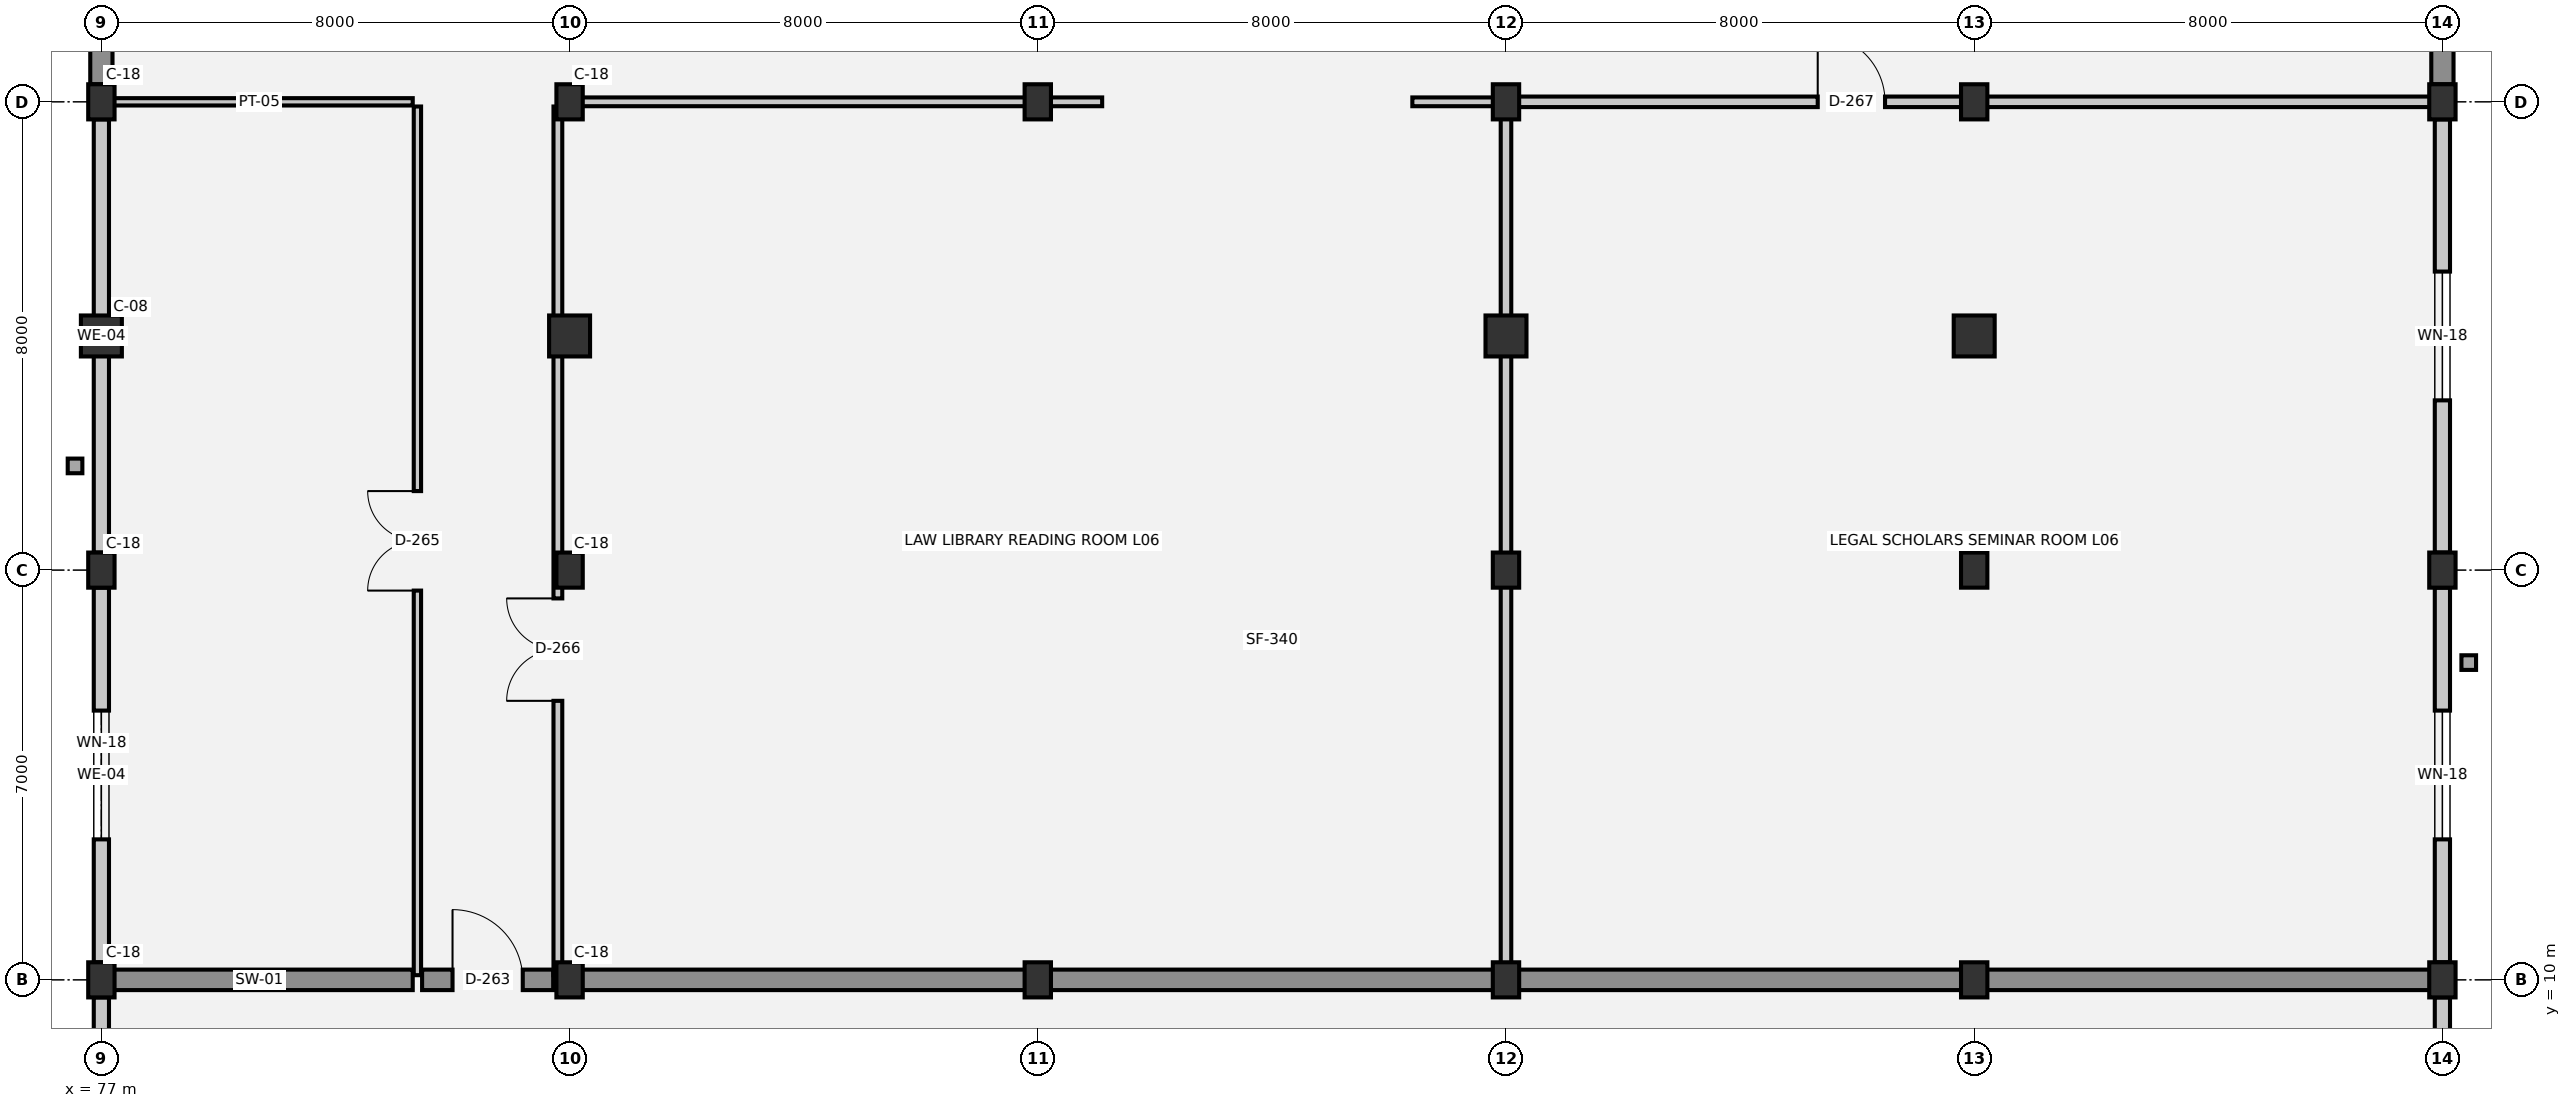
"""IFC4 building model, lengths in metres.
Left out: names, types, materials, properties, quantities, classifications, styles, units other than length and angle.
Written with IfcOpenShell. Run it as: python <this file> out.ifc"""

import sys

from ifc_helpers import new_model, si_unit, direction, frame, frame_2d, origin, origin_2d, place, context, subcontext, project, spatial, rectangle, circle, extrude, element, fill, save


model = new_model("IFC4")
c1 = context("Model", 3, precision=1e-05, world=origin(), true_north=direction((0.0, 1.0)))
c2 = subcontext(c1, "Body", "Model", "MODEL_VIEW")
j1 = project(units=[si_unit("LENGTHUNIT", "METRE"), si_unit("PLANEANGLEUNIT", "RADIAN")], contexts=[c1])
p1 = place(None, origin())
s1 = spatial("IfcSite", under=j1, at=p1, CompositionType="ELEMENT")
p2 = place(p1, origin())
s2 = spatial("IfcBuilding", under=s1, at=p2, CompositionType="ELEMENT")
p3 = place(p2, frame((0.0, 0.0, 22.05)))
s3 = spatial("IfcBuildingStorey", under=s2, at=p3, CompositionType="ELEMENT", Elevation=22.05)
for number, where, z_axis, x_axis in (
    (1, (77.0, 10.0, 0.0), (0.0, 0.0, 1.0), (1.0, 0.0, 0.0)),
    (2, (77.0, 17.0, 0.0), (0.0, 0.0, 1.0), (1.0, 0.0, 0.0)),
    (3, (77.0, 25.0, 0.0), (0.0, 0.0, 1.0), (1.0, 0.0, 0.0)),
    (4, (85.0, 10.0, 0.0), (0.0, 0.0, 1.0), (1.0, 0.0, 0.0)),
    (5, (85.0, 17.0, 0.0), (0.0, 0.0, 1.0), (1.0, 0.0, 0.0)),
    (6, (85.0, 25.0, 0.0), (0.0, 0.0, 1.0), (1.0, 0.0, 0.0)),
    (7, (93.0, 10.0, 0.0), (0.0, 0.0, 1.0), (1.0, 0.0, 0.0)),
    (8, (93.0, 25.0, 0.0), (0.0, 0.0, 1.0), (1.0, 0.0, 0.0)),
    (9, (101.0, 10.0, 0.0), (0.0, 0.0, 1.0), (1.0, 0.0, 0.0)),
    (10, (101.0, 17.0, 0.0), (0.0, 0.0, 1.0), (1.0, 0.0, 0.0)),
    (11, (101.0, 25.0, 0.0), (0.0, 0.0, 1.0), (1.0, 0.0, 0.0)),
    (12, (109.0, 10.0, 0.0), (0.0, 0.0, 1.0), (1.0, 0.0, 0.0)),
    (13, (109.0, 17.0, 0.0), (0.0, 0.0, 1.0), (1.0, 0.0, 0.0)),
    (14, (109.0, 25.0, 0.0), (0.0, 0.0, 1.0), (1.0, 0.0, 0.0)),
    (15, (117.0, 10.0, 0.0), (0.0, 0.0, 1.0), (1.0, 0.0, 0.0)),
    (16, (117.0, 17.0, 0.0), (0.0, 0.0, 1.0), (1.0, 0.0, 0.0)),
    (17, (117.0, 25.0, 0.0), (0.0, 0.0, 1.0), (1.0, 0.0, 0.0)),
):
    element("IfcColumn", number, at=place(p3, frame(where, z_axis=z_axis, x_axis=x_axis)), inside=s3, PredefinedType="COLUMN", context=c2, shape_type="SweptSolid", body=[
        extrude(rectangle(XDim=0.45, YDim=0.6, at=origin_2d()), origin(), (0.0, 0.0, 1.0), 3.75),
    ])
for number, where, z_axis, x_axis in (
    (18, (77.0, 21.0, 0.0), (0.0, 0.0, 1.0), (1.0, 0.0, 0.0)),
    (19, (85.0, 21.0, 0.0), (0.0, 0.0, 1.0), (1.0, 0.0, 0.0)),
    (20, (101.0, 21.0, 0.0), (0.0, 0.0, 1.0), (1.0, 0.0, 0.0)),
    (21, (109.0, 21.0, 0.0), (0.0, 0.0, 1.0), (1.0, 0.0, 0.0)),
):
    element("IfcColumn", number, at=place(p3, frame(where, z_axis=z_axis, x_axis=x_axis)), inside=s3, PredefinedType="COLUMN", context=c2, shape_type="SweptSolid", body=[
        extrude(circle(Radius=0.35, at=origin_2d()), origin(), (0.0, 0.0, 1.0), 3.75),
    ])
p4 = place(p3, frame((77.0, 4.3, 0.0), z_axis=(0.0, 0.0, 1.0), x_axis=(0.0, 1.0, 0.0)))
e22 = element("IfcWall", 22, at=p4, inside=s3, PredefinedType="SOLIDWALL", context=c2, shape_type="SweptSolid", body=[
    extrude(rectangle(XDim=5.4, YDim=0.26, at=frame_2d((2.7, 0.0))), origin(), (0.0, 0.0, 1.0), 2.71),
])
p5 = place(p4, frame((2.15, 0.0, 0.9)))
e23 = element("IfcOpeningElement", 23, at=p5, cuts=e22, PredefinedType="OPENING", context=c2, shape_type="SweptSolid", body=[
    extrude(rectangle(XDim=1.1, YDim=1.2, at=frame_2d((0.55, 0.6))), frame((0.0, 0.14, 0.0), z_axis=(0.0, -1.0, 0.0), x_axis=(1.0, 0.0, 0.0)), (0.0, 0.0, 1.0), 0.28),
])
p6 = place(p3, frame((77.0, 10.3, 0.0), z_axis=(0.0, 0.0, 1.0), x_axis=(0.0, 1.0, 0.0)))
e24 = element("IfcWall", 24, at=p6, inside=s3, PredefinedType="SOLIDWALL", context=c2, shape_type="SweptSolid", body=[
    extrude(rectangle(XDim=6.4, YDim=0.26, at=frame_2d((3.2, 0.0))), origin(), (0.0, 0.0, 1.0), 2.71),
])
p7 = place(p6, frame((2.1, 0.0, 0.9)))
e25 = element("IfcOpeningElement", 25, at=p7, cuts=e24, PredefinedType="OPENING", context=c2, shape_type="SweptSolid", body=[
    extrude(rectangle(XDim=2.2, YDim=1.0, at=frame_2d((1.1, 0.5))), frame((0.0, 0.14, 0.0), z_axis=(0.0, -1.0, 0.0), x_axis=(1.0, 0.0, 0.0)), (0.0, 0.0, 1.0), 0.28),
])
p8 = place(p3, frame((77.0, 17.3, 0.0), z_axis=(0.0, 0.0, 1.0), x_axis=(0.0, 1.0, 0.0)))
e26 = element("IfcWall", 26, at=p8, inside=s3, PredefinedType="SOLIDWALL", context=c2, shape_type="SweptSolid", body=[
    extrude(rectangle(XDim=7.4, YDim=0.26, at=frame_2d((3.7, 0.0))), origin(), (0.0, 0.0, 1.0), 2.71),
])
for number, where, z_axis, x_axis in (
    (27, (77.0, 25.3, 0.0), (0.0, 0.0, 1.0), (0.0, 1.0, 0.0)),
    (28, (117.0, 31.7, 0.0), (0.0, 0.0, 1.0), (0.0, -1.0, 0.0)),
):
    element("IfcWall", number, at=place(p3, frame(where, z_axis=z_axis, x_axis=x_axis)), inside=s3, PredefinedType="STANDARD", context=c2, shape_type="SweptSolid", body=[
        extrude(rectangle(XDim=6.4, YDim=0.38, at=frame_2d((3.2, 0.0))), origin(), (0.0, 0.0, 1.0), 2.71),
    ])
p9 = place(p3, frame((117.0, 24.7, 0.0), z_axis=(0.0, 0.0, 1.0), x_axis=(0.0, -1.0, 0.0)))
e29 = element("IfcWall", 29, at=p9, inside=s3, PredefinedType="SOLIDWALL", context=c2, shape_type="SweptSolid", body=[
    extrude(rectangle(XDim=7.4, YDim=0.26, at=frame_2d((3.7, 0.0))), origin(), (0.0, 0.0, 1.0), 2.71),
])
p10 = place(p9, frame((2.6, 0.0, 0.9)))
e30 = element("IfcOpeningElement", 30, at=p10, cuts=e29, PredefinedType="OPENING", context=c2, shape_type="SweptSolid", body=[
    extrude(rectangle(XDim=2.2, YDim=1.0, at=frame_2d((1.1, 0.5))), frame((0.0, 0.14, 0.0), z_axis=(0.0, -1.0, 0.0), x_axis=(1.0, 0.0, 0.0)), (0.0, 0.0, 1.0), 0.28),
])
p11 = place(p3, frame((117.0, 16.7, 0.0), z_axis=(0.0, 0.0, 1.0), x_axis=(0.0, -1.0, 0.0)))
e31 = element("IfcWall", 31, at=p11, inside=s3, PredefinedType="SOLIDWALL", context=c2, shape_type="SweptSolid", body=[
    extrude(rectangle(XDim=6.4, YDim=0.26, at=frame_2d((3.2, 0.0))), origin(), (0.0, 0.0, 1.0), 2.71),
])
p12 = place(p11, frame((2.1, 0.0, 0.9)))
e32 = element("IfcOpeningElement", 32, at=p12, cuts=e31, PredefinedType="OPENING", context=c2, shape_type="SweptSolid", body=[
    extrude(rectangle(XDim=2.2, YDim=1.0, at=frame_2d((1.1, 0.5))), frame((0.0, 0.14, 0.0), z_axis=(0.0, -1.0, 0.0), x_axis=(1.0, 0.0, 0.0)), (0.0, 0.0, 1.0), 0.28),
])
p13 = place(p3, frame((117.0, 9.7, 0.0), z_axis=(0.0, 0.0, 1.0), x_axis=(0.0, -1.0, 0.0)))
e33 = element("IfcWall", 33, at=p13, inside=s3, PredefinedType="SOLIDWALL", context=c2, shape_type="SweptSolid", body=[
    extrude(rectangle(XDim=5.4, YDim=0.26, at=frame_2d((2.7, 0.0))), origin(), (0.0, 0.0, 1.0), 2.71),
])
p14 = place(p13, frame((2.15, 0.0, 0.9)))
e34 = element("IfcOpeningElement", 34, at=p14, cuts=e33, PredefinedType="OPENING", context=c2, shape_type="SweptSolid", body=[
    extrude(rectangle(XDim=1.1, YDim=1.2, at=frame_2d((0.55, 0.6))), frame((0.0, 0.14, 0.0), z_axis=(0.0, -1.0, 0.0), x_axis=(1.0, 0.0, 0.0)), (0.0, 0.0, 1.0), 0.28),
])
p15 = place(p3, frame((77.08, 10.0, 0.0), z_axis=(0.0, 0.0, 1.0), x_axis=(1.0, 0.0, 0.0)))
e35 = element("IfcWall", 35, at=p15, inside=s3, PredefinedType="SHEAR", context=c2, shape_type="SweptSolid", body=[
    extrude(rectangle(XDim=5.24, YDim=0.35, at=frame_2d((2.62, 0.0))), origin(), (0.0, 0.0, 1.0), 3.39),
])
p16 = place(p3, frame((82.48, 10.0, 0.0), z_axis=(0.0, 0.0, 1.0), x_axis=(1.0, 0.0, 0.0)))
e36 = element("IfcWall", 36, at=p16, inside=s3, PredefinedType="SHEAR", context=c2, shape_type="SweptSolid", body=[
    extrude(rectangle(XDim=2.24, YDim=0.35, at=frame_2d((1.12, 0.0))), origin(), (0.0, 0.0, 1.0), 3.39),
])
p17 = place(p16, frame((0.52, 0.0, 0.0)))
e37 = element("IfcOpeningElement", 37, at=p17, cuts=e36, PredefinedType="OPENING", context=c2, shape_type="SweptSolid", body=[
    extrude(rectangle(XDim=1.2, YDim=2.15, at=frame_2d((0.6, 1.075))), frame((0.0, 0.185, 0.0), z_axis=(0.0, -1.0, 0.0), x_axis=(1.0, 0.0, 0.0)), (0.0, 0.0, 1.0), 0.37),
])
p18 = place(p3, frame((84.88, 10.0, 0.0), z_axis=(0.0, 0.0, 1.0), x_axis=(1.0, 0.0, 0.0)))
e38 = element("IfcWall", 38, at=p18, inside=s3, PredefinedType="SHEAR", context=c2, shape_type="SweptSolid", body=[
    extrude(rectangle(XDim=16.04, YDim=0.35, at=frame_2d((8.02, 0.0))), origin(), (0.0, 0.0, 1.0), 3.39),
])
p19 = place(p3, frame((101.08, 10.0, 0.0), z_axis=(0.0, 0.0, 1.0), x_axis=(1.0, 0.0, 0.0)))
e39 = element("IfcWall", 39, at=p19, inside=s3, PredefinedType="SHEAR", context=c2, shape_type="SweptSolid", body=[
    extrude(rectangle(XDim=15.84, YDim=0.35, at=frame_2d((7.92, 0.0))), origin(), (0.0, 0.0, 1.0), 3.39),
])
p20 = place(p3, frame((77.08, 25.0, 0.0), z_axis=(0.0, 0.0, 1.0), x_axis=(1.0, 0.0, 0.0)))
e40 = element("IfcWall", 40, at=p20, inside=s3, PredefinedType="PARTITIONING", context=c2, shape_type="SweptSolid", body=[
    extrude(rectangle(XDim=5.24, YDim=0.125, at=frame_2d((2.62, 0.0))), origin(), (0.0, 0.0, 1.0), 2.83),
])
p21 = place(p3, frame((84.88, 25.0, 0.0), z_axis=(0.0, 0.0, 1.0), x_axis=(1.0, 0.0, 0.0)))
e41 = element("IfcWall", 41, at=p21, inside=s3, PredefinedType="PARTITIONING", context=c2, shape_type="SweptSolid", body=[
    extrude(rectangle(XDim=9.22, YDim=0.15, at=frame_2d((4.61, 0.0))), origin(), (0.0, 0.0, 1.0), 2.83),
])
p22 = place(p3, frame((99.4, 25.0, 0.0), z_axis=(0.0, 0.0, 1.0), x_axis=(1.0, 0.0, 0.0)))
e42 = element("IfcWall", 42, at=p22, inside=s3, PredefinedType="PARTITIONING", context=c2, shape_type="SweptSolid", body=[
    extrude(rectangle(XDim=1.52, YDim=0.15, at=frame_2d((0.76, 0.0))), origin(), (0.0, 0.0, 1.0), 2.83),
])
p23 = place(p3, frame((101.08, 25.0, 0.0), z_axis=(0.0, 0.0, 1.0), x_axis=(1.0, 0.0, 0.0)))
e43 = element("IfcWall", 43, at=p23, inside=s3, PredefinedType="PARTITIONING", context=c2, shape_type="SweptSolid", body=[
    extrude(rectangle(XDim=15.84, YDim=0.18, at=frame_2d((7.92, 0.0))), origin(), (0.0, 0.0, 1.0), 2.83),
])
p24 = place(p23, frame((5.247, 0.0, 0.0)))
e44 = element("IfcOpeningElement", 44, at=p24, cuts=e43, PredefinedType="OPENING", context=c2, shape_type="SweptSolid", body=[
    extrude(rectangle(XDim=1.15, YDim=2.2, at=frame_2d((0.575, 1.1))), frame((0.0, 0.1, 0.0), z_axis=(0.0, -1.0, 0.0), x_axis=(1.0, 0.0, 0.0)), (0.0, 0.0, 1.0), 0.2),
])
p25 = place(p3, frame((82.4, 10.08, 0.0), z_axis=(0.0, 0.0, 1.0), x_axis=(0.0, 1.0, 0.0)))
e45 = element("IfcWall", 45, at=p25, inside=s3, PredefinedType="PARTITIONING", context=c2, shape_type="SweptSolid", body=[
    extrude(rectangle(XDim=14.84, YDim=0.125, at=frame_2d((7.42, 0.0))), origin(), (0.0, 0.0, 1.0), 3.39),
])
p26 = place(p25, frame((6.57, 0.0, 0.0)))
e46 = element("IfcOpeningElement", 46, at=p26, cuts=e45, PredefinedType="OPENING", context=c2, shape_type="SweptSolid", body=[
    extrude(rectangle(XDim=1.7, YDim=2.3, at=frame_2d((0.85, 1.15))), frame((0.0, 0.073, 0.0), z_axis=(0.0, -1.0, 0.0), x_axis=(1.0, 0.0, 0.0)), (0.0, 0.0, 1.0), 0.145),
])
p27 = place(p3, frame((84.8, 10.08, 0.0), z_axis=(0.0, 0.0, 1.0), x_axis=(0.0, 1.0, 0.0)))
e47 = element("IfcWall", 47, at=p27, inside=s3, PredefinedType="PARTITIONING", context=c2, shape_type="SweptSolid", body=[
    extrude(rectangle(XDim=14.84, YDim=0.15, at=frame_2d((7.42, 0.0))), origin(), (0.0, 0.0, 1.0), 2.88),
])
p28 = place(p27, frame((4.687, 0.0, 0.0)))
e48 = element("IfcOpeningElement", 48, at=p28, cuts=e47, PredefinedType="OPENING", context=c2, shape_type="SweptSolid", body=[
    extrude(rectangle(XDim=1.75, YDim=2.3, at=frame_2d((0.875, 1.15))), frame((0.0, 0.085, 0.0), z_axis=(0.0, -1.0, 0.0), x_axis=(1.0, 0.0, 0.0)), (0.0, 0.0, 1.0), 0.17),
])
p29 = place(p3, frame((101.0, 10.08, 0.0), z_axis=(0.0, 0.0, 1.0), x_axis=(0.0, 1.0, 0.0)))
e49 = element("IfcWall", 49, at=p29, inside=s3, PredefinedType="PARTITIONING", context=c2, shape_type="SweptSolid", body=[
    extrude(rectangle(XDim=14.84, YDim=0.18, at=frame_2d((7.42, 0.0))), origin(), (0.0, 0.0, 1.0), 2.88),
])
p30 = place(p7, origin())
e50 = element("IfcWindow", 50, at=p30, inside=s3, PartitioningType="SINGLE_PANEL", PredefinedType="WINDOW", context=c2, shape_type="SweptSolid", body=[
    extrude(rectangle(XDim=2.2, YDim=1.0, at=frame_2d((1.1, 0.5))), frame((0.0, 0.03, 0.0), z_axis=(0.0, -1.0, 0.0), x_axis=(1.0, 0.0, 0.0)), (0.0, 0.0, 1.0), 0.06),
])
fill(e25, e50)
p31 = place(p10, origin())
e51 = element("IfcWindow", 51, at=p31, inside=s3, PartitioningType="SINGLE_PANEL", PredefinedType="WINDOW", context=c2, shape_type="SweptSolid", body=[
    extrude(rectangle(XDim=2.2, YDim=1.0, at=frame_2d((1.1, 0.5))), frame((0.0, 0.03, 0.0), z_axis=(0.0, -1.0, 0.0), x_axis=(1.0, 0.0, 0.0)), (0.0, 0.0, 1.0), 0.06),
])
fill(e30, e51)
p32 = place(p12, origin())
e52 = element("IfcWindow", 52, at=p32, inside=s3, PartitioningType="SINGLE_PANEL", PredefinedType="WINDOW", context=c2, shape_type="SweptSolid", body=[
    extrude(rectangle(XDim=2.2, YDim=1.0, at=frame_2d((1.1, 0.5))), frame((0.0, 0.03, 0.0), z_axis=(0.0, -1.0, 0.0), x_axis=(1.0, 0.0, 0.0)), (0.0, 0.0, 1.0), 0.06),
])
fill(e32, e52)
p33 = place(p17, origin())
e53 = element("IfcDoor", 53, at=p33, inside=s3, OperationType="SINGLE_SWING_LEFT", PredefinedType="DOOR", context=c2, shape_type="SweptSolid", body=[
    extrude(rectangle(XDim=1.2, YDim=2.15, at=frame_2d((0.6, 1.075))), frame((0.0, 0.025, 0.0), z_axis=(0.0, -1.0, 0.0), x_axis=(1.0, 0.0, 0.0)), (0.0, 0.0, 1.0), 0.05),
])
fill(e37, e53)
p34 = place(p26, origin())
e54 = element("IfcDoor", 54, at=p34, inside=s3, OperationType="DOUBLE_DOOR_SINGLE_SWING", PredefinedType="DOOR", context=c2, shape_type="SweptSolid", body=[
    extrude(rectangle(XDim=1.7, YDim=2.3, at=frame_2d((0.85, 1.15))), frame((0.0, 0.025, 0.0), z_axis=(0.0, -1.0, 0.0), x_axis=(1.0, 0.0, 0.0)), (0.0, 0.0, 1.0), 0.05),
])
fill(e46, e54)
p35 = place(p28, origin())
e55 = element("IfcDoor", 55, at=p35, inside=s3, OperationType="DOUBLE_DOOR_SINGLE_SWING", PredefinedType="DOOR", context=c2, shape_type="SweptSolid", body=[
    extrude(rectangle(XDim=1.75, YDim=2.3, at=frame_2d((0.875, 1.15))), frame((0.0, 0.025, 0.0), z_axis=(0.0, -1.0, 0.0), x_axis=(1.0, 0.0, 0.0)), (0.0, 0.0, 1.0), 0.05),
])
fill(e48, e55)
p36 = place(p24, origin())
e56 = element("IfcDoor", 56, at=p36, inside=s3, OperationType="SINGLE_SWING_LEFT", PredefinedType="DOOR", context=c2, shape_type="SweptSolid", body=[
    extrude(rectangle(XDim=1.15, YDim=2.2, at=frame_2d((0.575, 1.1))), frame((0.0, 0.025, 0.0), z_axis=(0.0, -1.0, 0.0), x_axis=(1.0, 0.0, 0.0)), (0.0, 0.0, 1.0), 0.05),
])
fill(e44, e56)
save(model, sys.argv[1])
